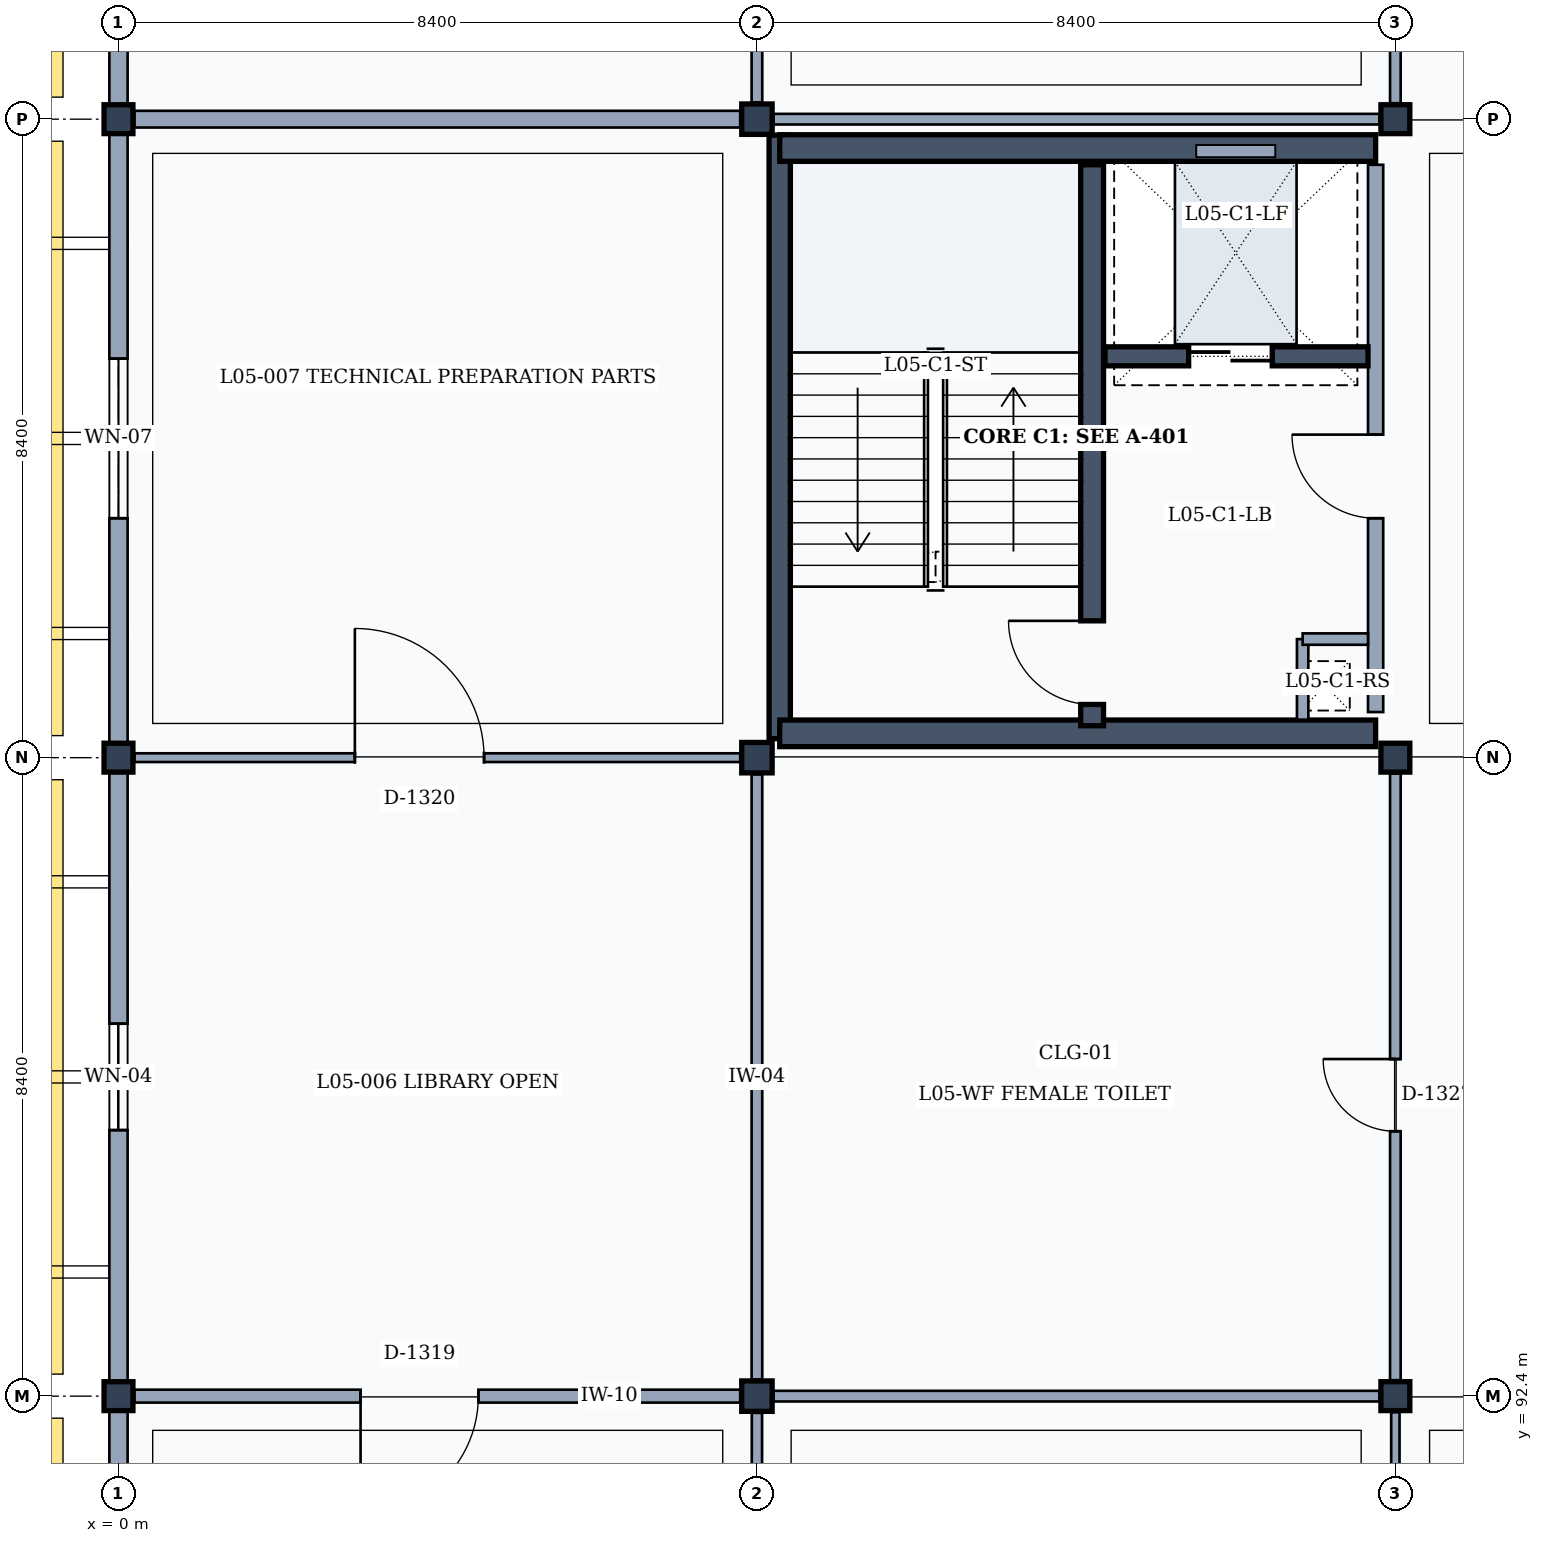
"""IFC4 building model, lengths in metres.
Left out: names, types, materials, properties, quantities, classifications, styles, units other than length and angle.
Written with IfcOpenShell. Run it as: python <this file> out.ifc"""

import sys

from ifc_helpers import new_model, si_unit, direction, frame, frame_2d, origin, origin_2d, place, context, subcontext, project, spatial, rectangle, extrude, element, fill, save


model = new_model("IFC4")
c1 = context("Model", 3, precision=1e-05, world=origin(), true_north=direction((0.0, 1.0)))
c2 = subcontext(c1, "Body", "Model", "MODEL_VIEW")
j1 = project(units=[si_unit("LENGTHUNIT", "METRE"), si_unit("PLANEANGLEUNIT", "RADIAN")], contexts=[c1])
p1 = place(None, origin())
s1 = spatial("IfcSite", under=j1, at=p1, CompositionType="ELEMENT")
p2 = place(p1, origin())
s2 = spatial("IfcBuilding", under=s1, at=p2, CompositionType="ELEMENT")
p3 = place(p2, frame((0.0, 0.0, 22.2)))
s3 = spatial("IfcBuildingStorey", under=s2, at=p3, CompositionType="ELEMENT", Elevation=22.2)
for number, where, z_axis, x_axis in (
    (1, (0.0, 92.4, 0.0), (0.0, 0.0, 1.0), (1.0, 0.0, 0.0)),
    (2, (0.0, 100.8, 0.0), (0.0, 0.0, 1.0), (1.0, 0.0, 0.0)),
    (3, (0.0, 109.2, 0.0), (0.0, 0.0, 1.0), (1.0, 0.0, 0.0)),
):
    element("IfcColumn", number, at=place(p3, frame(where, z_axis=z_axis, x_axis=x_axis)), inside=s3, PredefinedType="COLUMN", context=c2, shape_type="SweptSolid", body=[
        extrude(rectangle(XDim=0.38, YDim=0.38, at=origin_2d()), origin(), (0.0, 0.0, 1.0), 4.2),
    ])
for number, where, z_axis, x_axis in (
    (4, (8.4, 92.4, 0.0), (0.0, 0.0, 1.0), (1.0, 0.0, 0.0)),
    (5, (8.4, 100.8, 0.0), (0.0, 0.0, 1.0), (1.0, 0.0, 0.0)),
    (6, (8.4, 109.2, 0.0), (0.0, 0.0, 1.0), (1.0, 0.0, 0.0)),
):
    element("IfcColumn", number, at=place(p3, frame(where, z_axis=z_axis, x_axis=x_axis)), inside=s3, PredefinedType="COLUMN", context=c2, shape_type="SweptSolid", body=[
        extrude(rectangle(XDim=0.4, YDim=0.4, at=origin_2d()), origin(), (0.0, 0.0, 1.0), 4.2),
    ])
for number, where, z_axis, x_axis in (
    (7, (16.8, 92.4, 0.0), (0.0, 0.0, 1.0), (1.0, 0.0, 0.0)),
    (8, (16.8, 100.8, 0.0), (0.0, 0.0, 1.0), (1.0, 0.0, 0.0)),
    (9, (16.8, 109.2, 0.0), (0.0, 0.0, 1.0), (1.0, 0.0, 0.0)),
):
    element("IfcColumn", number, at=place(p3, frame(where, z_axis=z_axis, x_axis=x_axis)), inside=s3, PredefinedType="COLUMN", context=c2, shape_type="SweptSolid", body=[
        extrude(rectangle(XDim=0.38, YDim=0.38, at=origin_2d()), origin(), (0.0, 0.0, 1.0), 4.2),
    ])
p4 = place(p3, frame((0.0, 84.19, 0.0), z_axis=(0.0, 0.0, 1.0), x_axis=(0.0, 1.0, 0.0)))
e10 = element("IfcWall", 10, at=p4, inside=s3, PredefinedType="SOLIDWALL", context=c2, shape_type="SweptSolid", body=[
    extrude(rectangle(XDim=8.02, YDim=0.24, at=frame_2d((4.01, 0.0))), origin(), (0.0, 0.0, 1.0), 3.36),
])
p5 = place(p4, frame((3.41, 0.0, 0.9)))
e11 = element("IfcOpeningElement", 11, at=p5, cuts=e10, PredefinedType="OPENING", context=c2, shape_type="SweptSolid", body=[
    extrude(rectangle(XDim=1.2, YDim=1.8, at=frame_2d((0.6, 0.9))), frame((0.0, 0.13, 0.0), z_axis=(0.0, -1.0, 0.0), x_axis=(1.0, 0.0, 0.0)), (0.0, 0.0, 1.0), 0.26),
])
p6 = place(p3, frame((0.0, 92.59, 0.0), z_axis=(0.0, 0.0, 1.0), x_axis=(0.0, 1.0, 0.0)))
e12 = element("IfcWall", 12, at=p6, inside=s3, PredefinedType="SOLIDWALL", context=c2, shape_type="SweptSolid", body=[
    extrude(rectangle(XDim=8.02, YDim=0.24, at=frame_2d((4.01, 0.0))), origin(), (0.0, 0.0, 1.0), 3.36),
])
p7 = place(p6, frame((3.31, 0.0, 0.9)))
e13 = element("IfcOpeningElement", 13, at=p7, cuts=e12, PredefinedType="OPENING", context=c2, shape_type="SweptSolid", body=[
    extrude(rectangle(XDim=1.4, YDim=2.1, at=frame_2d((0.7, 1.05))), frame((0.0, 0.13, 0.0), z_axis=(0.0, -1.0, 0.0), x_axis=(1.0, 0.0, 0.0)), (0.0, 0.0, 1.0), 0.26),
])
p8 = place(p3, frame((0.0, 100.99, 0.0), z_axis=(0.0, 0.0, 1.0), x_axis=(0.0, 1.0, 0.0)))
e14 = element("IfcWall", 14, at=p8, inside=s3, PredefinedType="SOLIDWALL", context=c2, shape_type="SweptSolid", body=[
    extrude(rectangle(XDim=8.02, YDim=0.24, at=frame_2d((4.01, 0.0))), origin(), (0.0, 0.0, 1.0), 3.36),
])
p9 = place(p8, frame((2.96, 0.0, 0.9)))
e15 = element("IfcOpeningElement", 15, at=p9, cuts=e14, PredefinedType="OPENING", context=c2, shape_type="SweptSolid", body=[
    extrude(rectangle(XDim=2.1, YDim=1.6, at=frame_2d((1.05, 0.8))), frame((0.0, 0.13, 0.0), z_axis=(0.0, -1.0, 0.0), x_axis=(1.0, 0.0, 0.0)), (0.0, 0.0, 1.0), 0.26),
])
p10 = place(p3, frame((0.0, 109.39, 0.0), z_axis=(0.0, 0.0, 1.0), x_axis=(0.0, 1.0, 0.0)))
e16 = element("IfcWall", 16, at=p10, inside=s3, PredefinedType="SOLIDWALL", context=c2, shape_type="SweptSolid", body=[
    extrude(rectangle(XDim=8.02, YDim=0.24, at=frame_2d((4.01, 0.0))), origin(), (0.0, 0.0, 1.0), 3.36),
])
p11 = place(p10, frame((3.26, 0.0, 0.9)))
e17 = element("IfcOpeningElement", 17, at=p11, cuts=e16, PredefinedType="OPENING", context=c2, shape_type="SweptSolid", body=[
    extrude(rectangle(XDim=1.5, YDim=1.85, at=frame_2d((0.75, 0.925))), frame((0.0, 0.13, 0.0), z_axis=(0.0, -1.0, 0.0), x_axis=(1.0, 0.0, 0.0)), (0.0, 0.0, 1.0), 0.26),
])
p12 = place(p3, frame((8.7, 101.05, 0.0), z_axis=(0.0, 0.0, 1.0), x_axis=(0.0, 1.0, 0.0)))
e18 = element("IfcWall", 18, at=p12, inside=s3, PredefinedType="SHEAR", context=c2, shape_type="SweptSolid", body=[
    extrude(rectangle(XDim=7.94, YDim=0.28, at=frame_2d((3.97, 0.0))), origin(), (0.0, 0.0, 1.0), 3.98),
])
p13 = place(p3, frame((8.7, 108.82, 0.0), z_axis=(0.0, 0.0, 1.0), x_axis=(1.0, 0.0, 0.0)))
e19 = element("IfcWall", 19, at=p13, inside=s3, PredefinedType="SHEAR", context=c2, shape_type="SweptSolid", body=[
    extrude(rectangle(XDim=7.84, YDim=0.35, at=frame_2d((3.92, 0.0))), origin(), (0.0, 0.0, 1.0), 3.98),
])
p14 = place(p3, frame((16.54, 108.6, 0.0), z_axis=(0.0, 0.0, 1.0), x_axis=(0.0, -1.0, 0.0)))
e20 = element("IfcWall", 20, at=p14, inside=s3, PredefinedType="PARTITIONING", context=c2, shape_type="SweptSolid", body=[
    extrude(rectangle(XDim=7.2, YDim=0.2, at=frame_2d((3.6, 0.0))), origin(), (0.0, 0.0, 1.0), 3.32),
])
p15 = place(p14, frame((3.55, 0.0, 0.0)))
e21 = element("IfcOpeningElement", 21, at=p15, cuts=e20, PredefinedType="OPENING", context=c2, shape_type="SweptSolid", body=[
    extrude(rectangle(XDim=1.1, YDim=2.15, at=frame_2d((0.55, 1.075))), frame((0.0, 0.11, 0.0), z_axis=(0.0, -1.0, 0.0), x_axis=(1.0, 0.0, 0.0)), (0.0, 0.0, 1.0), 0.22),
])
p16 = place(p3, frame((16.54, 101.12, 0.0), z_axis=(0.0, 0.0, 1.0), x_axis=(-1.0, 0.0, 0.0)))
e22 = element("IfcWall", 22, at=p16, inside=s3, PredefinedType="SHEAR", context=c2, shape_type="SweptSolid", body=[
    extrude(rectangle(XDim=7.84, YDim=0.35, at=frame_2d((3.92, 0.0))), origin(), (0.0, 0.0, 1.0), 3.98),
])
p17 = place(p3, frame((12.81, 101.22, 0.0), z_axis=(0.0, 0.0, 1.0), x_axis=(0.0, 1.0, 0.0)))
e23 = element("IfcWall", 23, at=p17, inside=s3, PredefinedType="SHEAR", context=c2, shape_type="SweptSolid", body=[
    extrude(rectangle(XDim=7.38, YDim=0.3, at=frame_2d((3.69, 0.0))), origin(), (0.0, 0.0, 1.0), 3.98),
])
p18 = place(p17, frame((0.28, 0.0, 0.0)))
e24 = element("IfcOpeningElement", 24, at=p18, cuts=e23, PredefinedType="OPENING", context=c2, shape_type="SweptSolid", body=[
    extrude(rectangle(XDim=1.1, YDim=2.15, at=frame_2d((0.55, 1.075))), frame((0.0, 0.16, 0.0), z_axis=(0.0, -1.0, 0.0), x_axis=(1.0, 0.0, 0.0)), (0.0, 0.0, 1.0), 0.32),
])
p19 = place(p3, frame((15.58, 102.36, 0.0), z_axis=(0.0, 0.0, 1.0), x_axis=(0.0, -1.0, 0.0)))
e25 = element("IfcWall", 25, at=p19, inside=s3, PredefinedType="PARTITIONING", context=c2, shape_type="SweptSolid", body=[
    extrude(rectangle(XDim=1.06, YDim=0.15, at=frame_2d((0.53, 0.0))), origin(), (0.0, 0.0, 1.0), 3.32),
])
p20 = place(p3, frame((15.58, 102.36, 0.0), z_axis=(0.0, 0.0, 1.0), x_axis=(1.0, 0.0, 0.0)))
e26 = element("IfcWall", 26, at=p20, inside=s3, PredefinedType="PARTITIONING", context=c2, shape_type="SweptSolid", body=[
    extrude(rectangle(XDim=0.86, YDim=0.15, at=frame_2d((0.43, 0.0))), origin(), (0.0, 0.0, 1.0), 3.32),
])
p21 = place(p3, frame((12.98, 106.08, 0.0), z_axis=(0.0, 0.0, 1.0), x_axis=(1.0, 0.0, 0.0)))
e27 = element("IfcWall", 27, at=p21, inside=s3, PredefinedType="SHEAR", context=c2, shape_type="SweptSolid", body=[
    extrude(rectangle(XDim=3.46, YDim=0.25, at=frame_2d((1.73, 0.0))), origin(), (0.0, 0.0, 1.0), 3.98),
])
p22 = place(p21, frame((1.1, 0.0, 0.0)))
e28 = element("IfcOpeningElement", 28, at=p22, cuts=e27, PredefinedType="OPENING", context=c2, shape_type="SweptSolid", body=[
    extrude(rectangle(XDim=1.1, YDim=2.15, at=frame_2d((0.55, 1.075))), frame((0.0, 0.135, 0.0), z_axis=(0.0, -1.0, 0.0), x_axis=(1.0, 0.0, 0.0)), (0.0, 0.0, 1.0), 0.27),
])
p23 = place(p3, frame((8.4, 84.22, 0.0), z_axis=(0.0, 0.0, 1.0), x_axis=(0.0, 1.0, 0.0)))
e29 = element("IfcWall", 29, at=p23, inside=s3, PredefinedType="PARTITIONING", context=c2, shape_type="SweptSolid", body=[
    extrude(rectangle(XDim=7.96, YDim=0.135, at=frame_2d((3.98, 0.0))), origin(), (0.0, 0.0, 1.0), 3.32),
])
p24 = place(p23, frame((3.1, 0.0, 0.0)))
e30 = element("IfcOpeningElement", 30, at=p24, cuts=e29, PredefinedType="OPENING", context=c2, shape_type="SweptSolid", body=[
    extrude(rectangle(XDim=1.3, YDim=2.2, at=frame_2d((0.65, 1.1))), frame((0.0, 0.077, 0.0), z_axis=(0.0, -1.0, 0.0), x_axis=(1.0, 0.0, 0.0)), (0.0, 0.0, 1.0), 0.155),
])
p25 = place(p3, frame((0.21, 92.4, 0.0), z_axis=(0.0, 0.0, 1.0), x_axis=(1.0, 0.0, 0.0)))
e31 = element("IfcWall", 31, at=p25, inside=s3, PredefinedType="PARTITIONING", context=c2, shape_type="SweptSolid", body=[
    extrude(rectangle(XDim=7.97, YDim=0.17, at=frame_2d((3.985, 0.0))), origin(), (0.0, 0.0, 1.0), 3.32),
])
p26 = place(p25, frame((2.975, 0.0, 0.0)))
e32 = element("IfcOpeningElement", 32, at=p26, cuts=e31, PredefinedType="OPENING", context=c2, shape_type="SweptSolid", body=[
    extrude(rectangle(XDim=1.55, YDim=2.35, at=frame_2d((0.775, 1.175))), frame((0.0, 0.095, 0.0), z_axis=(0.0, -1.0, 0.0), x_axis=(1.0, 0.0, 0.0)), (0.0, 0.0, 1.0), 0.19),
])
p27 = place(p3, frame((8.4, 92.62, 0.0), z_axis=(0.0, 0.0, 1.0), x_axis=(0.0, 1.0, 0.0)))
e33 = element("IfcWall", 33, at=p27, inside=s3, PredefinedType="PARTITIONING", context=c2, shape_type="SweptSolid", body=[
    extrude(rectangle(XDim=7.96, YDim=0.14, at=frame_2d((3.98, 0.0))), origin(), (0.0, 0.0, 1.0), 3.32),
])
p28 = place(p3, frame((0.21, 100.8, 0.0), z_axis=(0.0, 0.0, 1.0), x_axis=(1.0, 0.0, 0.0)))
e34 = element("IfcWall", 34, at=p28, inside=s3, PredefinedType="PARTITIONING", context=c2, shape_type="SweptSolid", body=[
    extrude(rectangle(XDim=7.97, YDim=0.115, at=frame_2d((3.985, 0.0))), origin(), (0.0, 0.0, 1.0), 3.32),
])
p29 = place(p28, frame((2.9, 0.0, 0.0)))
e35 = element("IfcOpeningElement", 35, at=p29, cuts=e34, PredefinedType="OPENING", context=c2, shape_type="SweptSolid", body=[
    extrude(rectangle(XDim=1.7, YDim=2.3, at=frame_2d((0.85, 1.15))), frame((0.0, 0.067, 0.0), z_axis=(0.0, -1.0, 0.0), x_axis=(1.0, 0.0, 0.0)), (0.0, 0.0, 1.0), 0.135),
])
p30 = place(p3, frame((0.21, 109.2, 0.0), z_axis=(0.0, 0.0, 1.0), x_axis=(1.0, 0.0, 0.0)))
e36 = element("IfcWall", 36, at=p30, inside=s3, PredefinedType="PARTITIONING", context=c2, shape_type="SweptSolid", body=[
    extrude(rectangle(XDim=7.97, YDim=0.22, at=frame_2d((3.985, 0.0))), origin(), (0.0, 0.0, 1.0), 3.32),
])
p31 = place(p3, frame((8.4, 109.42, 0.0), z_axis=(0.0, 0.0, 1.0), x_axis=(0.0, 1.0, 0.0)))
e37 = element("IfcWall", 37, at=p31, inside=s3, PredefinedType="PARTITIONING", context=c2, shape_type="SweptSolid", body=[
    extrude(rectangle(XDim=7.96, YDim=0.14, at=frame_2d((3.98, 0.0))), origin(), (0.0, 0.0, 1.0), 3.32),
])
p32 = place(p3, frame((16.8, 84.21, 0.0), z_axis=(0.0, 0.0, 1.0), x_axis=(0.0, 1.0, 0.0)))
e38 = element("IfcWall", 38, at=p32, inside=s3, PredefinedType="PARTITIONING", context=c2, shape_type="SweptSolid", body=[
    extrude(rectangle(XDim=7.98, YDim=0.11, at=frame_2d((3.99, 0.0))), origin(), (0.0, 0.0, 1.0), 3.32),
])
p33 = place(p32, frame((3.25, 0.0, 0.0)))
e39 = element("IfcOpeningElement", 39, at=p33, cuts=e38, PredefinedType="OPENING", context=c2, shape_type="SweptSolid", body=[
    extrude(rectangle(XDim=1.0, YDim=2.15, at=frame_2d((0.5, 1.075))), frame((0.0, 0.065, 0.0), z_axis=(0.0, -1.0, 0.0), x_axis=(1.0, 0.0, 0.0)), (0.0, 0.0, 1.0), 0.13),
])
p34 = place(p3, frame((8.62, 92.4, 0.0), z_axis=(0.0, 0.0, 1.0), x_axis=(1.0, 0.0, 0.0)))
e40 = element("IfcWall", 40, at=p34, inside=s3, PredefinedType="PARTITIONING", context=c2, shape_type="SweptSolid", body=[
    extrude(rectangle(XDim=7.97, YDim=0.14, at=frame_2d((3.985, 0.0))), origin(), (0.0, 0.0, 1.0), 3.32),
])
p35 = place(p3, frame((16.8, 92.61, 0.0), z_axis=(0.0, 0.0, 1.0), x_axis=(0.0, 1.0, 0.0)))
e41 = element("IfcWall", 41, at=p35, inside=s3, PredefinedType="PARTITIONING", context=c2, shape_type="SweptSolid", body=[
    extrude(rectangle(XDim=7.98, YDim=0.14, at=frame_2d((3.99, 0.0))), origin(), (0.0, 0.0, 1.0), 3.32),
])
p36 = place(p35, frame((3.275, 0.0, 0.0)))
e42 = element("IfcOpeningElement", 42, at=p36, cuts=e41, PredefinedType="OPENING", context=c2, shape_type="SweptSolid", body=[
    extrude(rectangle(XDim=0.95, YDim=2.15, at=frame_2d((0.475, 1.075))), frame((0.0, 0.08, 0.0), z_axis=(0.0, -1.0, 0.0), x_axis=(1.0, 0.0, 0.0)), (0.0, 0.0, 1.0), 0.16),
])
p37 = place(p3, frame((8.62, 109.2, 0.0), z_axis=(0.0, 0.0, 1.0), x_axis=(1.0, 0.0, 0.0)))
e43 = element("IfcWall", 43, at=p37, inside=s3, PredefinedType="PARTITIONING", context=c2, shape_type="SweptSolid", body=[
    extrude(rectangle(XDim=7.97, YDim=0.14, at=frame_2d((3.985, 0.0))), origin(), (0.0, 0.0, 1.0), 3.32),
])
p38 = place(p3, frame((16.8, 109.41, 0.0), z_axis=(0.0, 0.0, 1.0), x_axis=(0.0, 1.0, 0.0)))
e44 = element("IfcWall", 44, at=p38, inside=s3, PredefinedType="PARTITIONING", context=c2, shape_type="SweptSolid", body=[
    extrude(rectangle(XDim=7.98, YDim=0.14, at=frame_2d((3.99, 0.0))), origin(), (0.0, 0.0, 1.0), 3.32),
])
p39 = place(p38, frame((3.275, 0.0, 0.0)))
e45 = element("IfcOpeningElement", 45, at=p39, cuts=e44, PredefinedType="OPENING", context=c2, shape_type="SweptSolid", body=[
    extrude(rectangle(XDim=0.95, YDim=2.15, at=frame_2d((0.475, 1.075))), frame((0.0, 0.08, 0.0), z_axis=(0.0, -1.0, 0.0), x_axis=(1.0, 0.0, 0.0)), (0.0, 0.0, 1.0), 0.16),
])
p40 = place(p7, origin())
e46 = element("IfcWindow", 46, at=p40, inside=s3, PartitioningType="SINGLE_PANEL", PredefinedType="WINDOW", context=c2, shape_type="SweptSolid", body=[
    extrude(rectangle(XDim=1.4, YDim=2.1, at=frame_2d((0.7, 1.05))), frame((0.0, 0.03, 0.0), z_axis=(0.0, -1.0, 0.0), x_axis=(1.0, 0.0, 0.0)), (0.0, 0.0, 1.0), 0.06),
])
fill(e13, e46)
p41 = place(p9, origin())
e47 = element("IfcWindow", 47, at=p41, inside=s3, PartitioningType="SINGLE_PANEL", PredefinedType="WINDOW", context=c2, shape_type="SweptSolid", body=[
    extrude(rectangle(XDim=2.1, YDim=1.6, at=frame_2d((1.05, 0.8))), frame((0.0, 0.03, 0.0), z_axis=(0.0, -1.0, 0.0), x_axis=(1.0, 0.0, 0.0)), (0.0, 0.0, 1.0), 0.06),
])
fill(e15, e47)
p42 = place(p15, frame((1.1, 0.0, 0.0), z_axis=(0.0, 0.0, 1.0), x_axis=(-1.0, 0.0, 0.0)))
e48 = element("IfcDoor", 48, at=p42, inside=s3, OperationType="SINGLE_SWING_RIGHT", PredefinedType="DOOR", context=c2, shape_type="SweptSolid", body=[
    extrude(rectangle(XDim=1.1, YDim=2.15, at=frame_2d((0.55, 1.075))), frame((0.0, 0.025, 0.0), z_axis=(0.0, -1.0, 0.0), x_axis=(1.0, 0.0, 0.0)), (0.0, 0.0, 1.0), 0.05),
])
fill(e21, e48)
p43 = place(p18, origin())
e49 = element("IfcDoor", 49, at=p43, inside=s3, OperationType="SINGLE_SWING_RIGHT", PredefinedType="DOOR", context=c2, shape_type="SweptSolid", body=[
    extrude(rectangle(XDim=1.1, YDim=2.15, at=frame_2d((0.55, 1.075))), frame((0.0, 0.025, 0.0), z_axis=(0.0, -1.0, 0.0), x_axis=(1.0, 0.0, 0.0)), (0.0, 0.0, 1.0), 0.05),
])
fill(e24, e49)
p44 = place(p22, origin())
e50 = element("IfcDoor", 50, at=p44, inside=s3, OperationType="DOUBLE_DOOR_SLIDING", PredefinedType="DOOR", context=c2, shape_type="SweptSolid", body=[
    extrude(rectangle(XDim=1.1, YDim=2.15, at=frame_2d((0.55, 1.075))), frame((0.0, 0.025, 0.0), z_axis=(0.0, -1.0, 0.0), x_axis=(1.0, 0.0, 0.0)), (0.0, 0.0, 1.0), 0.05),
])
fill(e28, e50)
p45 = place(p26, frame((1.55, 0.0, 0.0), z_axis=(0.0, 0.0, 1.0), x_axis=(-1.0, 0.0, 0.0)))
e51 = element("IfcDoor", 51, at=p45, inside=s3, OperationType="SINGLE_SWING_RIGHT", PredefinedType="DOOR", context=c2, shape_type="SweptSolid", body=[
    extrude(rectangle(XDim=1.55, YDim=2.35, at=frame_2d((0.775, 1.175))), frame((0.0, 0.025, 0.0), z_axis=(0.0, -1.0, 0.0), x_axis=(1.0, 0.0, 0.0)), (0.0, 0.0, 1.0), 0.05),
])
fill(e32, e51)
p46 = place(p29, origin())
e52 = element("IfcDoor", 52, at=p46, inside=s3, OperationType="SINGLE_SWING_LEFT", PredefinedType="DOOR", context=c2, shape_type="SweptSolid", body=[
    extrude(rectangle(XDim=1.7, YDim=2.3, at=frame_2d((0.85, 1.15))), frame((0.0, 0.025, 0.0), z_axis=(0.0, -1.0, 0.0), x_axis=(1.0, 0.0, 0.0)), (0.0, 0.0, 1.0), 0.05),
])
fill(e35, e52)
p47 = place(p36, origin())
e53 = element("IfcDoor", 53, at=p47, inside=s3, OperationType="SINGLE_SWING_RIGHT", PredefinedType="DOOR", context=c2, shape_type="SweptSolid", body=[
    extrude(rectangle(XDim=0.95, YDim=2.15, at=frame_2d((0.475, 1.075))), frame((0.0, 0.025, 0.0), z_axis=(0.0, -1.0, 0.0), x_axis=(1.0, 0.0, 0.0)), (0.0, 0.0, 1.0), 0.05),
])
fill(e42, e53)
save(model, sys.argv[1])
